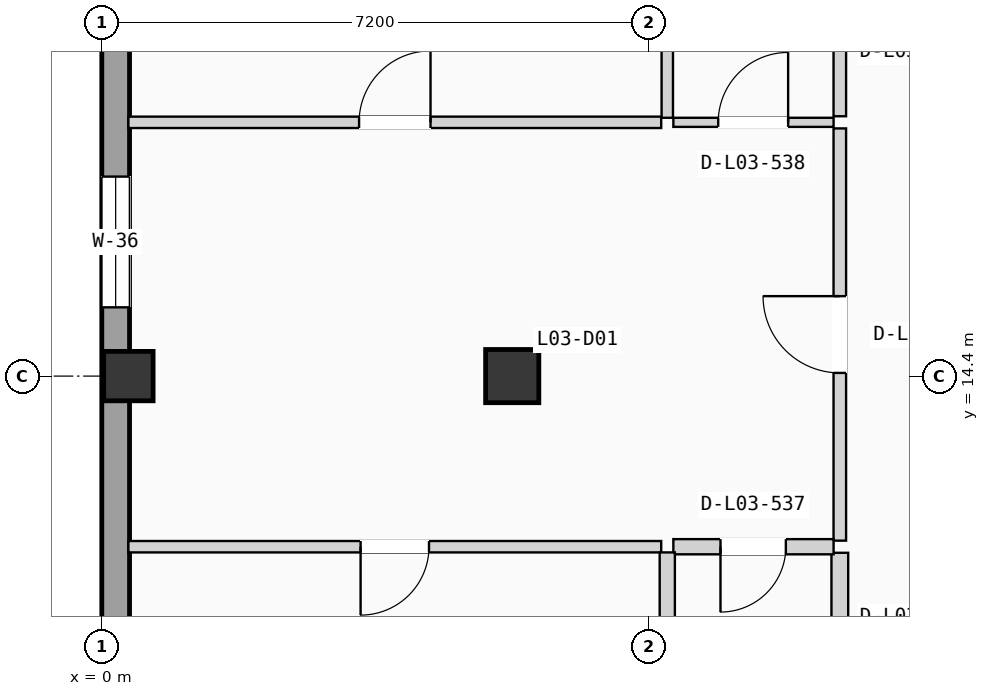
"""IFC4 building model, lengths in metres.
Left out: names, types, materials, properties, quantities, classifications, styles, units other than length and angle.
Written with IfcOpenShell. Run it as: python <this file> out.ifc"""

import sys

from ifc_helpers import new_model, si_unit, direction, frame, frame_2d, origin, origin_2d, place, context, subcontext, project, spatial, rectangle, extrude, element, fill, save


model = new_model("IFC4")
c1 = context("Model", 3, precision=1e-05, world=origin(), true_north=direction((0.0, 1.0)))
c2 = subcontext(c1, "Body", "Model", "MODEL_VIEW")
j1 = project(units=[si_unit("LENGTHUNIT", "METRE"), si_unit("PLANEANGLEUNIT", "RADIAN")], contexts=[c1])
p1 = place(None, origin())
s1 = spatial("IfcSite", under=j1, at=p1, CompositionType="ELEMENT")
p2 = place(p1, origin())
s2 = spatial("IfcBuilding", under=s1, at=p2, CompositionType="ELEMENT")
p3 = place(p2, frame((0.0, 0.0, 12.075)))
s3 = spatial("IfcBuildingStorey", under=s2, at=p3, CompositionType="ELEMENT", Elevation=12.075)
p4 = place(p3, frame((0.35, 14.4, 0.0), z_axis=(0.0, 0.0, 1.0), x_axis=(1.0, 0.0, 0.0)))
e1 = element("IfcColumn", 1, at=p4, inside=s3, PredefinedType="COLUMN", context=c2, shape_type="SweptSolid", body=[
    extrude(rectangle(XDim=0.65, YDim=0.65, at=origin_2d()), origin(), (0.0, 0.0, 1.0), 3.15),
])
p5 = place(p3, frame((5.4, 14.4, 0.0), z_axis=(0.0, 0.0, 1.0), x_axis=(1.0, 0.0, 0.0)))
e2 = element("IfcColumn", 2, at=p5, inside=s3, PredefinedType="COLUMN", context=c2, shape_type="SweptSolid", body=[
    extrude(rectangle(XDim=0.7, YDim=0.7, at=origin_2d()), origin(), (0.0, 0.0, 1.0), 3.15),
])
p6 = place(p3, frame((0.183, 0.365, 0.0), z_axis=(0.0, 0.0, 1.0), x_axis=(0.0, 1.0, 0.0)))
e3 = element("IfcWall", 3, at=p6, inside=s3, PredefinedType="SOLIDWALL", context=c2, shape_type="SweptSolid", body=[
    extrude(rectangle(XDim=49.67, YDim=0.365, at=frame_2d((24.835, 0.0))), origin(), (0.0, 0.0, 1.0), 2.89),
])
p7 = place(p6, frame((14.94, 0.0, 0.9)))
e4 = element("IfcOpeningElement", 4, at=p7, cuts=e3, PredefinedType="OPENING", context=c2, shape_type="SweptSolid", body=[
    extrude(rectangle(XDim=1.72, YDim=1.2, at=frame_2d((0.86, 0.6))), frame((0.0, 0.192, 0.0), z_axis=(0.0, -1.0, 0.0), x_axis=(1.0, 0.0, 0.0)), (0.0, 0.0, 1.0), 0.385),
])
p8 = place(p6, frame((8.612, 0.0, 0.855)))
e5 = element("IfcOpeningElement", 5, at=p8, cuts=e3, PredefinedType="OPENING", context=c2, shape_type="SweptSolid", body=[
    extrude(rectangle(XDim=1.72, YDim=1.35, at=frame_2d((0.86, 0.675))), frame((0.0, 0.192, 0.0), z_axis=(0.0, -1.0, 0.0), x_axis=(1.0, 0.0, 0.0)), (0.0, 0.0, 1.0), 0.385),
])
p9 = place(p6, frame((18.35, 0.0, 0.705)))
e6 = element("IfcOpeningElement", 6, at=p9, cuts=e3, PredefinedType="OPENING", context=c2, shape_type="SweptSolid", body=[
    extrude(rectangle(XDim=1.72, YDim=1.5, at=frame_2d((0.86, 0.75))), frame((0.0, 0.192, 0.0), z_axis=(0.0, -1.0, 0.0), x_axis=(1.0, 0.0, 0.0)), (0.0, 0.0, 1.0), 0.385),
])
p10 = place(p6, frame((31.175, 0.0, 0.555)))
e7 = element("IfcOpeningElement", 7, at=p10, cuts=e3, PredefinedType="OPENING", context=c2, shape_type="SweptSolid", body=[
    extrude(rectangle(XDim=1.72, YDim=1.65, at=frame_2d((0.86, 0.825))), frame((0.0, 0.192, 0.0), z_axis=(0.0, -1.0, 0.0), x_axis=(1.0, 0.0, 0.0)), (0.0, 0.0, 1.0), 0.385),
])
p11 = place(p6, frame((24.662, 0.0, 0.85)))
e8 = element("IfcOpeningElement", 8, at=p11, cuts=e3, PredefinedType="OPENING", context=c2, shape_type="SweptSolid", body=[
    extrude(rectangle(XDim=0.95, YDim=1.2, at=frame_2d((0.475, 0.6))), frame((0.0, 0.192, 0.0), z_axis=(0.0, -1.0, 0.0), x_axis=(1.0, 0.0, 0.0)), (0.0, 0.0, 1.0), 0.385),
])
p12 = place(p6, frame((38.245, 0.0, 0.9)))
e9 = element("IfcOpeningElement", 9, at=p12, cuts=e3, PredefinedType="OPENING", context=c2, shape_type="SweptSolid", body=[
    extrude(rectangle(XDim=1.85, YDim=1.2, at=frame_2d((0.925, 0.6))), frame((0.0, 0.192, 0.0), z_axis=(0.0, -1.0, 0.0), x_axis=(1.0, 0.0, 0.0)), (0.0, 0.0, 1.0), 0.385),
])
p13 = place(p3, frame((9.71, 12.235, 0.0), z_axis=(0.0, 0.0, 1.0), x_axis=(0.0, 1.0, 0.0)))
e10 = element("IfcWall", 10, at=p13, inside=s3, PredefinedType="PARTITIONING", context=c2, shape_type="SweptSolid", body=[
    extrude(rectangle(XDim=5.424, YDim=0.165, at=frame_2d((2.712, 0.0))), origin(), (0.0, 0.0, 1.0), 2.87),
])
p14 = place(p13, frame((2.207, 0.0, 0.0)))
e11 = element("IfcOpeningElement", 11, at=p14, cuts=e10, PredefinedType="OPENING", context=c2, shape_type="SweptSolid", body=[
    extrude(rectangle(XDim=1.01, YDim=2.11, at=frame_2d((0.505, 1.055))), frame((0.0, 0.093, 0.0), z_axis=(0.0, -1.0, 0.0), x_axis=(1.0, 0.0, 0.0)), (0.0, 0.0, 1.0), 0.185),
])
p15 = place(p3, frame((9.71, 7.6, 0.0), z_axis=(0.0, 0.0, 1.0), x_axis=(0.0, 1.0, 0.0)))
e12 = element("IfcWall", 12, at=p15, inside=s3, PredefinedType="PLUMBINGWALL", context=c2, shape_type="SweptSolid", body=[
    extrude(rectangle(XDim=4.475, YDim=0.22, at=frame_2d((2.237, 0.0))), origin(), (0.0, 0.0, 1.0), 2.87),
])
p16 = place(p3, frame((9.71, 17.819, 0.0), z_axis=(0.0, 0.0, 1.0), x_axis=(0.0, 1.0, 0.0)))
e13 = element("IfcWall", 13, at=p16, inside=s3, PredefinedType="PARTITIONING", context=c2, shape_type="SweptSolid", body=[
    extrude(rectangle(XDim=4.475, YDim=0.165, at=frame_2d((2.237, 0.0))), origin(), (0.0, 0.0, 1.0), 2.87),
])
p17 = place(p3, frame((7.52, 12.155, 0.0), z_axis=(0.0, 0.0, 1.0), x_axis=(1.0, 0.0, 0.0)))
e14 = element("IfcWall", 14, at=p17, inside=s3, PredefinedType="PLUMBINGWALL", context=c2, shape_type="SweptSolid", body=[
    extrude(rectangle(XDim=2.108, YDim=0.2, at=frame_2d((1.054, 0.0))), origin(), (0.0, 0.0, 1.0), 2.87),
])
p18 = place(p17, frame((0.62, 0.0, 0.0)))
e15 = element("IfcOpeningElement", 15, at=p18, cuts=e14, PredefinedType="OPENING", context=c2, shape_type="SweptSolid", body=[
    extrude(rectangle(XDim=0.86, YDim=2.0, at=frame_2d((0.43, 1.0))), frame((0.0, 0.11, 0.0), z_axis=(0.0, -1.0, 0.0), x_axis=(1.0, 0.0, 0.0)), (0.0, 0.0, 1.0), 0.22),
])
p19 = place(p3, frame((7.52, 17.739, 0.0), z_axis=(0.0, 0.0, 1.0), x_axis=(1.0, 0.0, 0.0)))
e16 = element("IfcWall", 16, at=p19, inside=s3, PredefinedType="PARTITIONING", context=c2, shape_type="SweptSolid", body=[
    extrude(rectangle(XDim=2.108, YDim=0.12, at=frame_2d((1.054, 0.0))), origin(), (0.0, 0.0, 1.0), 2.87),
])
p20 = place(p19, frame((0.59, 0.0, 0.0)))
e17 = element("IfcOpeningElement", 17, at=p20, cuts=e16, PredefinedType="OPENING", context=c2, shape_type="SweptSolid", body=[
    extrude(rectangle(XDim=0.92, YDim=2.02, at=frame_2d((0.46, 1.01))), frame((0.0, 0.07, 0.0), z_axis=(0.0, -1.0, 0.0), x_axis=(1.0, 0.0, 0.0)), (0.0, 0.0, 1.0), 0.14),
])
p21 = place(p3, frame((0.35, 12.155, 0.0), z_axis=(0.0, 0.0, 1.0), x_axis=(1.0, 0.0, 0.0)))
e18 = element("IfcWall", 18, at=p21, inside=s3, PredefinedType="PARTITIONING", context=c2, shape_type="SweptSolid", body=[
    extrude(rectangle(XDim=7.01, YDim=0.15, at=frame_2d((3.505, 0.0))), origin(), (0.0, 0.0, 1.0), 2.87),
])
p22 = place(p21, frame((3.055, 0.0, 0.0)))
e19 = element("IfcOpeningElement", 19, at=p22, cuts=e18, PredefinedType="OPENING", context=c2, shape_type="SweptSolid", body=[
    extrude(rectangle(XDim=0.9, YDim=2.04, at=frame_2d((0.45, 1.02))), frame((0.0, 0.085, 0.0), z_axis=(0.0, -1.0, 0.0), x_axis=(1.0, 0.0, 0.0)), (0.0, 0.0, 1.0), 0.17),
])
p23 = place(p3, frame((0.35, 17.739, 0.0), z_axis=(0.0, 0.0, 1.0), x_axis=(1.0, 0.0, 0.0)))
e20 = element("IfcWall", 20, at=p23, inside=s3, PredefinedType="PARTITIONING", context=c2, shape_type="SweptSolid", body=[
    extrude(rectangle(XDim=7.01, YDim=0.15, at=frame_2d((3.505, 0.0))), origin(), (0.0, 0.0, 1.0), 2.87),
])
p24 = place(p23, frame((3.035, 0.0, 0.0)))
e21 = element("IfcOpeningElement", 21, at=p24, cuts=e20, PredefinedType="OPENING", context=c2, shape_type="SweptSolid", body=[
    extrude(rectangle(XDim=0.94, YDim=2.06, at=frame_2d((0.47, 1.03))), frame((0.0, 0.085, 0.0), z_axis=(0.0, -1.0, 0.0), x_axis=(1.0, 0.0, 0.0)), (0.0, 0.0, 1.0), 0.17),
])
p25 = place(p3, frame((7.44, 7.6, 0.0), z_axis=(0.0, 0.0, 1.0), x_axis=(0.0, 1.0, 0.0)))
e22 = element("IfcWall", 22, at=p25, inside=s3, PredefinedType="PLUMBINGWALL", context=c2, shape_type="SweptSolid", body=[
    extrude(rectangle(XDim=4.48, YDim=0.2, at=frame_2d((2.24, 0.0))), origin(), (0.0, 0.0, 1.0), 2.87),
])
p26 = place(p3, frame((7.44, 17.799, 0.0), z_axis=(0.0, 0.0, 1.0), x_axis=(0.0, 1.0, 0.0)))
e23 = element("IfcWall", 23, at=p26, inside=s3, PredefinedType="PARTITIONING", context=c2, shape_type="SweptSolid", body=[
    extrude(rectangle(XDim=4.495, YDim=0.15, at=frame_2d((2.248, 0.0))), origin(), (0.0, 0.0, 1.0), 2.87),
])
p27 = place(p7, origin())
e24 = element("IfcWindow", 24, at=p27, inside=s3, PartitioningType="DOUBLE_PANEL_VERTICAL", PredefinedType="WINDOW", context=c2, shape_type="SweptSolid", body=[
    extrude(rectangle(XDim=1.72, YDim=1.2, at=frame_2d((0.86, 0.6))), frame((0.0, 0.03, 0.0), z_axis=(0.0, -1.0, 0.0), x_axis=(1.0, 0.0, 0.0)), (0.0, 0.0, 1.0), 0.06),
])
fill(e4, e24)
p28 = place(p14, origin())
e25 = element("IfcDoor", 25, at=p28, inside=s3, OperationType="SINGLE_SWING_RIGHT", PredefinedType="DOOR", context=c2, shape_type="SweptSolid", body=[
    extrude(rectangle(XDim=1.01, YDim=2.11, at=frame_2d((0.505, 1.055))), frame((0.0, 0.025, 0.0), z_axis=(0.0, -1.0, 0.0), x_axis=(1.0, 0.0, 0.0)), (0.0, 0.0, 1.0), 0.05),
])
fill(e11, e25)
p29 = place(p18, frame((0.86, 0.0, 0.0), z_axis=(0.0, 0.0, 1.0), x_axis=(-1.0, 0.0, 0.0)))
e26 = element("IfcDoor", 26, at=p29, inside=s3, OperationType="SINGLE_SWING_LEFT", PredefinedType="DOOR", context=c2, shape_type="SweptSolid", body=[
    extrude(rectangle(XDim=0.86, YDim=2.0, at=frame_2d((0.43, 1.0))), frame((0.0, 0.025, 0.0), z_axis=(0.0, -1.0, 0.0), x_axis=(1.0, 0.0, 0.0)), (0.0, 0.0, 1.0), 0.05),
])
fill(e15, e26)
p30 = place(p20, origin())
e27 = element("IfcDoor", 27, at=p30, inside=s3, OperationType="SINGLE_SWING_RIGHT", PredefinedType="DOOR", context=c2, shape_type="SweptSolid", body=[
    extrude(rectangle(XDim=0.92, YDim=2.02, at=frame_2d((0.46, 1.01))), frame((0.0, 0.025, 0.0), z_axis=(0.0, -1.0, 0.0), x_axis=(1.0, 0.0, 0.0)), (0.0, 0.0, 1.0), 0.05),
])
fill(e17, e27)
p31 = place(p22, frame((0.9, 0.0, 0.0), z_axis=(0.0, 0.0, 1.0), x_axis=(-1.0, 0.0, 0.0)))
e28 = element("IfcDoor", 28, at=p31, inside=s3, OperationType="SINGLE_SWING_LEFT", PredefinedType="DOOR", context=c2, shape_type="SweptSolid", body=[
    extrude(rectangle(XDim=0.9, YDim=2.04, at=frame_2d((0.45, 1.02))), frame((0.0, 0.025, 0.0), z_axis=(0.0, -1.0, 0.0), x_axis=(1.0, 0.0, 0.0)), (0.0, 0.0, 1.0), 0.05),
])
fill(e19, e28)
p32 = place(p24, origin())
e29 = element("IfcDoor", 29, at=p32, inside=s3, OperationType="SINGLE_SWING_RIGHT", PredefinedType="DOOR", context=c2, shape_type="SweptSolid", body=[
    extrude(rectangle(XDim=0.94, YDim=2.06, at=frame_2d((0.47, 1.03))), frame((0.0, 0.025, 0.0), z_axis=(0.0, -1.0, 0.0), x_axis=(1.0, 0.0, 0.0)), (0.0, 0.0, 1.0), 0.05),
])
fill(e21, e29)
save(model, sys.argv[1])
